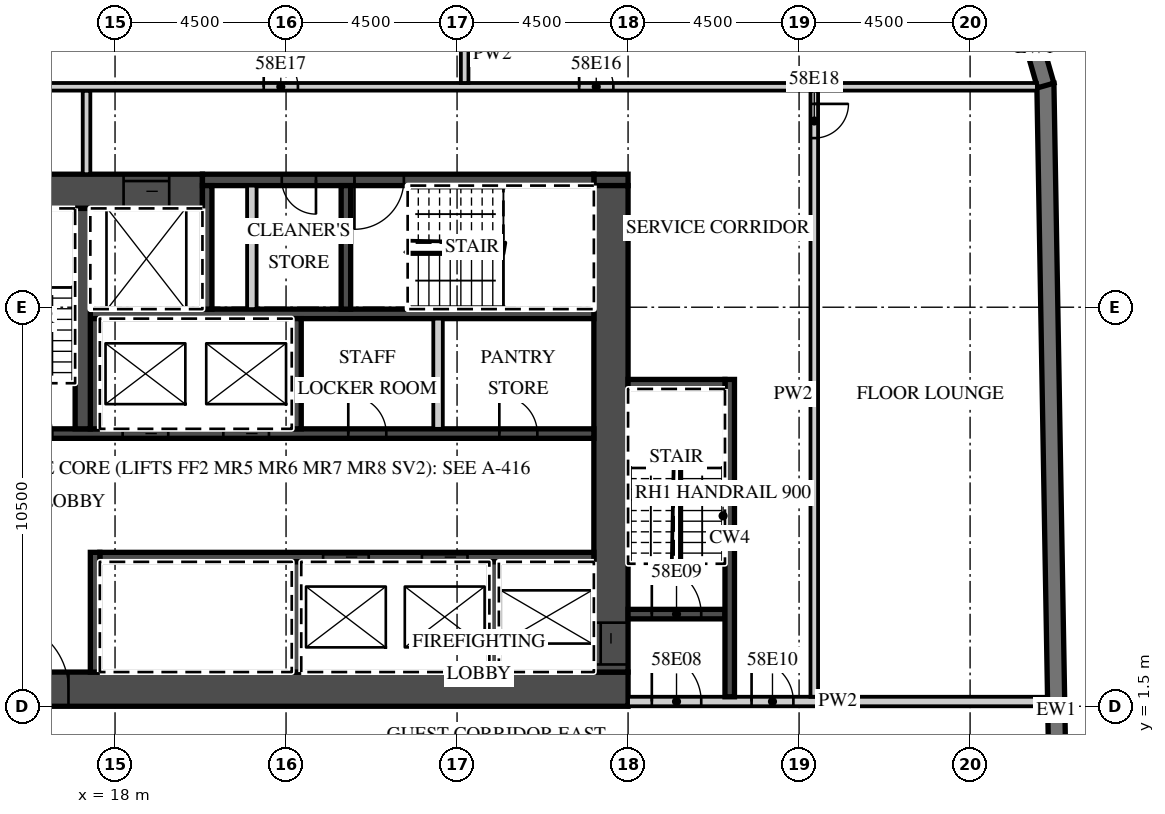
"""IFC4 building model, lengths in metres.
Left out: names, types, materials, properties, quantities, classifications, styles, units other than length and angle.
Written with IfcOpenShell. Run it as: python <this file> out.ifc"""

import sys

from ifc_helpers import new_model, si_unit, direction, frame, frame_2d, origin, place, context, subcontext, project, spatial, polyline, rectangle, outline, extrude, element, fill, save


model = new_model("IFC4")
c1 = context("Model", 3, precision=1e-05, world=origin(), true_north=direction((0.0, 1.0)))
c2 = subcontext(c1, "Body", "Model", "MODEL_VIEW")
j1 = project(units=[si_unit("LENGTHUNIT", "METRE"), si_unit("PLANEANGLEUNIT", "RADIAN")], contexts=[c1])
p1 = place(None, origin())
s1 = spatial("IfcSite", under=j1, at=p1, CompositionType="ELEMENT")
p2 = place(p1, origin())
s2 = spatial("IfcBuilding", under=s1, at=p2, CompositionType="ELEMENT")
p3 = place(p2, frame((0.0, 0.0, 237.5)))
s3 = spatial("IfcBuildingStorey", under=s2, at=p3, CompositionType="ELEMENT", Elevation=237.5)
p4 = place(p3, frame((43.057, -15.103, 0.0), z_axis=(0.0, 0.0, 1.0), x_axis=(-0.017452408953, 0.999847695112, 0.0)))
e1 = element("IfcWall", 1, at=p4, inside=s3, PredefinedType="SOLIDWALL", context=c2, shape_type="SweptSolid", body=[
    extrude(rectangle(XDim=33.0, YDim=0.45, at=frame_2d((16.5, 0.0))), origin(), (0.0, 0.0, 1.0), 3.02),
])
p5 = place(p3, frame((42.49, 17.833, 0.0), z_axis=(0.0, 0.0, 1.0), x_axis=(-0.275546368831, 0.961287781377, 0.0)))
e2 = element("IfcWall", 2, at=p5, inside=s3, PredefinedType="SOLIDWALL", context=c2, shape_type="SweptSolid", body=[
    extrude(outline(polyline([(0.0, -0.225), (2.071, -0.225), (1.95, 0.225), (0.121, 0.225), (0.0, -0.225)])), origin(), (0.0, 0.0, 1.0), 3.02),
])
p6 = place(p3, frame((13.5, 1.95, 0.0), z_axis=(0.0, 0.0, 1.0), x_axis=(1.0, 0.0, 0.0)))
e3 = element("IfcWall", 3, at=p6, inside=s3, PredefinedType="SHEAR", context=c2, shape_type="SweptSolid", body=[
    extrude(rectangle(XDim=18.0, YDim=0.9, at=frame_2d((9.0, 0.0))), origin(), (0.0, 0.0, 1.0), 3.02),
])
p7 = place(p6, frame((1.475, 0.0, 0.0)))
e4 = element("IfcOpeningElement", 4, at=p7, cuts=e3, PredefinedType="OPENING", context=c2, shape_type="SweptSolid", body=[
    extrude(rectangle(XDim=1.8, YDim=2.1, at=frame_2d((0.9, 1.05))), frame((0.0, 0.46, 0.0), z_axis=(0.0, -1.0, 0.0), x_axis=(1.0, 0.0, 0.0)), (0.0, 0.0, 1.0), 0.92),
])
p8 = place(p3, frame((13.5, 15.05, 0.0), z_axis=(0.0, 0.0, 1.0), x_axis=(1.0, 0.0, 0.0)))
e5 = element("IfcWall", 5, at=p8, inside=s3, PredefinedType="SHEAR", context=c2, shape_type="SweptSolid", body=[
    extrude(rectangle(XDim=6.8, YDim=0.9, at=frame_2d((3.4, 0.0))), origin(), (0.0, 0.0, 1.0), 3.02),
])
p9 = place(p8, frame((4.725, 0.0, 0.0)))
e6 = element("IfcOpeningElement", 6, at=p9, cuts=e5, PredefinedType="OPENING", context=c2, shape_type="SweptSolid", body=[
    extrude(rectangle(XDim=1.2, YDim=2.1, at=frame_2d((0.6, 1.05))), frame((0.0, 0.46, 0.0), z_axis=(0.0, -1.0, 0.0), x_axis=(1.0, 0.0, 0.0)), (0.0, 0.0, 1.0), 0.92),
])
p10 = place(p3, frame((30.6, 15.35, 0.0), z_axis=(0.0, 0.0, 1.0), x_axis=(1.0, 0.0, 0.0)))
e7 = element("IfcWall", 7, at=p10, inside=s3, PredefinedType="SHEAR", context=c2, shape_type="SweptSolid", body=[
    extrude(rectangle(XDim=0.9, YDim=0.3, at=frame_2d((0.45, 0.0))), origin(), (0.0, 0.0, 1.0), 3.02),
])
p11 = place(p3, frame((20.3, 15.35, 0.0), z_axis=(0.0, 0.0, 1.0), x_axis=(1.0, 0.0, 0.0)))
e8 = element("IfcWall", 8, at=p11, inside=s3, PredefinedType="SHEAR", context=c2, shape_type="SweptSolid", body=[
    extrude(rectangle(XDim=10.3, YDim=0.3, at=frame_2d((5.15, 0.0))), origin(), (0.0, 0.0, 1.0), 3.02),
])
p12 = place(p11, frame((4.0, 0.0, 0.0)))
e9 = element("IfcOpeningElement", 9, at=p12, cuts=e8, PredefinedType="OPENING", context=c2, shape_type="SweptSolid", body=[
    extrude(rectangle(XDim=1.3, YDim=2.1, at=frame_2d((0.65, 1.05))), frame((0.0, 0.16, 0.0), z_axis=(0.0, -1.0, 0.0), x_axis=(1.0, 0.0, 0.0)), (0.0, 0.0, 1.0), 0.32),
])
p13 = place(p11, frame((2.087, 0.0, 0.0)))
e10 = element("IfcOpeningElement", 10, at=p13, cuts=e8, PredefinedType="OPENING", context=c2, shape_type="SweptSolid", body=[
    extrude(rectangle(XDim=0.9, YDim=2.1, at=frame_2d((0.45, 1.05))), frame((0.0, 0.16, 0.0), z_axis=(0.0, -1.0, 0.0), x_axis=(1.0, 0.0, 0.0)), (0.0, 0.0, 1.0), 0.32),
])
p14 = place(p3, frame((31.05, 2.4, 0.0), z_axis=(0.0, 0.0, 1.0), x_axis=(0.0, 1.0, 0.0)))
e11 = element("IfcWall", 11, at=p14, inside=s3, PredefinedType="SHEAR", context=c2, shape_type="SweptSolid", body=[
    extrude(rectangle(XDim=12.8, YDim=0.9, at=frame_2d((6.4, 0.0))), origin(), (0.0, 0.0, 1.0), 3.02),
])
p15 = place(p14, frame((0.2, 0.0, 0.0)))
e12 = element("IfcOpeningElement", 12, at=p15, cuts=e11, PredefinedType="OPENING", context=c2, shape_type="SweptSolid", body=[
    extrude(rectangle(XDim=1.1, YDim=2.1, at=frame_2d((0.55, 1.05))), frame((0.0, 0.46, 0.0), z_axis=(0.0, -1.0, 0.0), x_axis=(1.0, 0.0, 0.0)), (0.0, 0.0, 1.0), 0.92),
])
p16 = place(p3, frame((17.6, 5.425, 0.0), z_axis=(0.0, 0.0, 1.0), x_axis=(1.0, 0.0, 0.0)))
e13 = element("IfcWall", 13, at=p16, inside=s3, PredefinedType="SHEAR", context=c2, shape_type="SweptSolid", body=[
    extrude(rectangle(XDim=13.0, YDim=0.25, at=frame_2d((6.5, 0.0))), origin(), (0.0, 0.0, 1.0), 3.02),
])
p17 = place(p16, frame((8.475, 0.0, 0.0)))
e14 = element("IfcOpeningElement", 14, at=p17, cuts=e13, PredefinedType="OPENING", context=c2, shape_type="SweptSolid", body=[
    extrude(rectangle(XDim=1.2, YDim=2.1, at=frame_2d((0.6, 1.05))), frame((0.0, 0.135, 0.0), z_axis=(0.0, -1.0, 0.0), x_axis=(1.0, 0.0, 0.0)), (0.0, 0.0, 1.0), 0.27),
])
p18 = place(p16, frame((5.875, 0.0, 0.0)))
e15 = element("IfcOpeningElement", 15, at=p18, cuts=e13, PredefinedType="OPENING", context=c2, shape_type="SweptSolid", body=[
    extrude(rectangle(XDim=1.2, YDim=2.1, at=frame_2d((0.6, 1.05))), frame((0.0, 0.135, 0.0), z_axis=(0.0, -1.0, 0.0), x_axis=(1.0, 0.0, 0.0)), (0.0, 0.0, 1.0), 0.27),
])
p19 = place(p3, frame((17.475, 2.4, 0.0), z_axis=(0.0, 0.0, 1.0), x_axis=(0.0, 1.0, 0.0)))
e16 = element("IfcWall", 16, at=p19, inside=s3, PredefinedType="SHEAR", context=c2, shape_type="SweptSolid", body=[
    extrude(rectangle(XDim=3.15, YDim=0.25, at=frame_2d((1.575, 0.0))), origin(), (0.0, 0.0, 1.0), 3.02),
])
for number, where, z_axis, x_axis in (
    (17, (27.975, 2.4, 0.0), (0.0, 0.0, 1.0), (0.0, 1.0, 0.0)),
    (18, (22.775, 2.4, 0.0), (0.0, 0.0, 1.0), (0.0, 1.0, 0.0)),
):
    element("IfcWall", number, at=place(p3, frame(where, z_axis=z_axis, x_axis=x_axis)), inside=s3, PredefinedType="SHEAR", context=c2, shape_type="SweptSolid", body=[
        extrude(rectangle(XDim=2.9, YDim=0.25, at=frame_2d((1.45, 0.0))), origin(), (0.0, 0.0, 1.0), 3.02),
    ])
p20 = place(p3, frame((14.4, 8.675, 0.0), z_axis=(0.0, 0.0, 1.0), x_axis=(1.0, 0.0, 0.0)))
e19 = element("IfcWall", 19, at=p20, inside=s3, PredefinedType="SHEAR", context=c2, shape_type="SweptSolid", body=[
    extrude(rectangle(XDim=16.2, YDim=0.25, at=frame_2d((8.1, 0.0))), origin(), (0.0, 0.0, 1.0), 3.02),
])
p21 = place(p20, frame((6.45, 0.0, 0.0)))
e20 = element("IfcOpeningElement", 20, at=p21, cuts=e19, PredefinedType="OPENING", context=c2, shape_type="SweptSolid", body=[
    extrude(rectangle(XDim=1.2, YDim=2.1, at=frame_2d((0.6, 1.05))), frame((0.0, 0.135, 0.0), z_axis=(0.0, -1.0, 0.0), x_axis=(1.0, 0.0, 0.0)), (0.0, 0.0, 1.0), 0.27),
])
p22 = place(p20, frame((3.8, 0.0, 0.0)))
e21 = element("IfcOpeningElement", 21, at=p22, cuts=e19, PredefinedType="OPENING", context=c2, shape_type="SweptSolid", body=[
    extrude(rectangle(XDim=1.2, YDim=2.1, at=frame_2d((0.6, 1.05))), frame((0.0, 0.135, 0.0), z_axis=(0.0, -1.0, 0.0), x_axis=(1.0, 0.0, 0.0)), (0.0, 0.0, 1.0), 0.27),
])
p23 = place(p20, frame((0.65, 0.0, 0.0)))
e22 = element("IfcOpeningElement", 22, at=p23, cuts=e19, PredefinedType="OPENING", context=c2, shape_type="SweptSolid", body=[
    extrude(rectangle(XDim=1.3, YDim=2.1, at=frame_2d((0.65, 1.05))), frame((0.0, 0.135, 0.0), z_axis=(0.0, -1.0, 0.0), x_axis=(1.0, 0.0, 0.0)), (0.0, 0.0, 1.0), 0.27),
])
p24 = place(p20, frame((13.712, 0.0, 0.0)))
e23 = element("IfcOpeningElement", 23, at=p24, cuts=e19, PredefinedType="OPENING", context=c2, shape_type="SweptSolid", body=[
    extrude(rectangle(XDim=1.0, YDim=2.1, at=frame_2d((0.5, 1.05))), frame((0.0, 0.135, 0.0), z_axis=(0.0, -1.0, 0.0), x_axis=(1.0, 0.0, 0.0)), (0.0, 0.0, 1.0), 0.27),
])
p25 = place(p20, frame((9.738, 0.0, 0.0)))
e24 = element("IfcOpeningElement", 24, at=p25, cuts=e19, PredefinedType="OPENING", context=c2, shape_type="SweptSolid", body=[
    extrude(rectangle(XDim=1.0, YDim=2.1, at=frame_2d((0.5, 1.05))), frame((0.0, 0.135, 0.0), z_axis=(0.0, -1.0, 0.0), x_axis=(1.0, 0.0, 0.0)), (0.0, 0.0, 1.0), 0.27),
])
p26 = place(p3, frame((17.35, 11.825, 0.0), z_axis=(0.0, 0.0, 1.0), x_axis=(1.0, 0.0, 0.0)))
e25 = element("IfcWall", 25, at=p26, inside=s3, PredefinedType="SHEAR", context=c2, shape_type="SweptSolid", body=[
    extrude(rectangle(XDim=13.25, YDim=0.25, at=frame_2d((6.625, 0.0))), origin(), (0.0, 0.0, 1.0), 3.02),
])
for number, where, z_axis, x_axis in (
    (26, (17.475, 8.8, 0.0), (0.0, 0.0, 1.0), (0.0, 1.0, 0.0)),
    (27, (22.775, 8.8, 0.0), (0.0, 0.0, 1.0), (0.0, 1.0, 0.0)),
):
    element("IfcWall", number, at=place(p3, frame(where, z_axis=z_axis, x_axis=x_axis)), inside=s3, PredefinedType="SHEAR", context=c2, shape_type="SweptSolid", body=[
        extrude(rectangle(XDim=2.9, YDim=0.25, at=frame_2d((1.45, 0.0))), origin(), (0.0, 0.0, 1.0), 3.02),
    ])
p27 = place(p3, frame((26.5, 8.8, 0.0), z_axis=(0.0, 0.0, 1.0), x_axis=(0.0, 1.0, 0.0)))
e28 = element("IfcWall", 28, at=p27, inside=s3, PredefinedType="PARTITIONING", context=c2, shape_type="SweptSolid", body=[
    extrude(rectangle(XDim=2.9, YDim=0.25, at=frame_2d((1.45, 0.0))), origin(), (0.0, 0.0, 1.0), 3.02),
])
p28 = place(p3, frame((17.15, 8.8, 0.0), z_axis=(0.0, 0.0, 1.0), x_axis=(0.0, 1.0, 0.0)))
e29 = element("IfcWall", 29, at=p28, inside=s3, PredefinedType="SHEAR", context=c2, shape_type="SweptSolid", body=[
    extrude(rectangle(XDim=5.8, YDim=0.4, at=frame_2d((2.9, 0.0))), origin(), (0.0, 0.0, 1.0), 3.02),
])
for number, where, z_axis, x_axis in (
    (30, (20.425, 11.95, 0.0), (0.0, 0.0, 1.0), (0.0, 1.0, 0.0)),
    (31, (24.075, 11.95, 0.0), (0.0, 0.0, 1.0), (0.0, 1.0, 0.0)),
):
    element("IfcWall", number, at=place(p3, frame(where, z_axis=z_axis, x_axis=x_axis)), inside=s3, PredefinedType="SHEAR", context=c2, shape_type="SweptSolid", body=[
        extrude(rectangle(XDim=3.25, YDim=0.25, at=frame_2d((1.625, 0.0))), origin(), (0.0, 0.0, 1.0), 3.02),
    ])
p29 = place(p3, frame((21.6, 11.95, 0.0), z_axis=(0.0, 0.0, 1.0), x_axis=(0.0, 1.0, 0.0)))
e32 = element("IfcWall", 32, at=p29, inside=s3, PredefinedType="PARTITIONING", context=c2, shape_type="SweptSolid", body=[
    extrude(rectangle(XDim=3.25, YDim=0.25, at=frame_2d((1.625, 0.0))), origin(), (0.0, 0.0, 1.0), 3.02),
])
p30 = place(p3, frame((31.5, 1.625, 0.0), z_axis=(0.0, 0.0, 1.0), x_axis=(1.0, 0.0, 0.0)))
e33 = element("IfcWall", 33, at=p30, inside=s3, PredefinedType="PARTITIONING", context=c2, shape_type="SweptSolid", body=[
    extrude(rectangle(XDim=11.04, YDim=0.25, at=frame_2d((5.52, 0.0))), origin(), (0.0, 0.0, 1.0), 3.02),
])
p31 = place(p30, frame((0.625, 0.0, 0.0)))
e34 = element("IfcOpeningElement", 34, at=p31, cuts=e33, PredefinedType="OPENING", context=c2, shape_type="SweptSolid", body=[
    extrude(rectangle(XDim=1.3, YDim=2.1, at=frame_2d((0.65, 1.05))), frame((0.0, 0.135, 0.0), z_axis=(0.0, -1.0, 0.0), x_axis=(1.0, 0.0, 0.0)), (0.0, 0.0, 1.0), 0.27),
])
p32 = place(p30, frame((3.25, 0.0, 0.0)))
e35 = element("IfcOpeningElement", 35, at=p32, cuts=e33, PredefinedType="OPENING", context=c2, shape_type="SweptSolid", body=[
    extrude(rectangle(XDim=1.1, YDim=2.1, at=frame_2d((0.55, 1.05))), frame((0.0, 0.135, 0.0), z_axis=(0.0, -1.0, 0.0), x_axis=(1.0, 0.0, 0.0)), (0.0, 0.0, 1.0), 0.27),
])
p33 = place(p3, frame((31.5, 3.925, 0.0), z_axis=(0.0, 0.0, 1.0), x_axis=(1.0, 0.0, 0.0)))
e36 = element("IfcWall", 36, at=p33, inside=s3, PredefinedType="SHEAR", context=c2, shape_type="SweptSolid", body=[
    extrude(rectangle(XDim=2.55, YDim=0.25, at=frame_2d((1.275, 0.0))), origin(), (0.0, 0.0, 1.0), 3.02),
])
p34 = place(p33, frame((0.625, 0.0, 0.0)))
e37 = element("IfcOpeningElement", 37, at=p34, cuts=e36, PredefinedType="OPENING", context=c2, shape_type="SweptSolid", body=[
    extrude(rectangle(XDim=1.3, YDim=2.1, at=frame_2d((0.65, 1.05))), frame((0.0, 0.135, 0.0), z_axis=(0.0, -1.0, 0.0), x_axis=(1.0, 0.0, 0.0)), (0.0, 0.0, 1.0), 0.27),
])
p35 = place(p3, frame((34.175, 1.75, 0.0), z_axis=(0.0, 0.0, 1.0), x_axis=(0.0, 1.0, 0.0)))
e38 = element("IfcWall", 38, at=p35, inside=s3, PredefinedType="SHEAR", context=c2, shape_type="SweptSolid", body=[
    extrude(rectangle(XDim=8.35, YDim=0.25, at=frame_2d((4.175, 0.0))), origin(), (0.0, 0.0, 1.0), 3.02),
])
p36 = place(p3, frame((31.5, 9.975, 0.0), z_axis=(0.0, 0.0, 1.0), x_axis=(1.0, 0.0, 0.0)))
e39 = element("IfcWall", 39, at=p36, inside=s3, PredefinedType="SHEAR", context=c2, shape_type="SweptSolid", body=[
    extrude(rectangle(XDim=2.55, YDim=0.25, at=frame_2d((1.275, 0.0))), origin(), (0.0, 0.0, 1.0), 3.02),
])
p37 = place(p3, frame((17.25, 15.5, 0.0), z_axis=(0.0, 0.0, 1.0), x_axis=(0.0, 1.0, 0.0)))
e40 = element("IfcWall", 40, at=p37, inside=s3, PredefinedType="PARTITIONING", context=c2, shape_type="SweptSolid", body=[
    extrude(rectangle(XDim=2.2, YDim=0.2, at=frame_2d((1.1, 0.0))), origin(), (0.0, 0.0, 1.0), 3.02),
])
p38 = place(p3, frame((36.4, 1.75, 0.0), z_axis=(0.0, 0.0, 1.0), x_axis=(0.0, 1.0, 0.0)))
e41 = element("IfcWall", 41, at=p38, inside=s3, PredefinedType="PARTITIONING", context=c2, shape_type="SweptSolid", body=[
    extrude(rectangle(XDim=15.95, YDim=0.2, at=frame_2d((7.975, 0.0))), origin(), (0.0, 0.0, 1.0), 3.02),
])
p39 = place(p38, frame((14.7, 0.0, 0.0)))
e42 = element("IfcOpeningElement", 42, at=p39, cuts=e41, PredefinedType="OPENING", context=c2, shape_type="SweptSolid", body=[
    extrude(rectangle(XDim=0.9, YDim=2.1, at=frame_2d((0.45, 1.05))), frame((0.0, 0.11, 0.0), z_axis=(0.0, -1.0, 0.0), x_axis=(1.0, 0.0, 0.0)), (0.0, 0.0, 1.0), 0.22),
])
p40 = place(p3, frame((13.6, 17.8, 0.0), z_axis=(0.0, 0.0, 1.0), x_axis=(1.0, 0.0, 0.0)))
e43 = element("IfcWall", 43, at=p40, inside=s3, PredefinedType="PARTITIONING", context=c2, shape_type="SweptSolid", body=[
    extrude(rectangle(XDim=28.657, YDim=0.2, at=frame_2d((14.329, 0.0))), origin(), (0.0, 0.0, 1.0), 3.02),
])
p41 = place(p40, frame((16.613, 0.0, 0.0)))
e44 = element("IfcOpeningElement", 44, at=p41, cuts=e43, PredefinedType="OPENING", context=c2, shape_type="SweptSolid", body=[
    extrude(rectangle(XDim=0.9, YDim=2.1, at=frame_2d((0.45, 1.05))), frame((0.0, 0.11, 0.0), z_axis=(0.0, -1.0, 0.0), x_axis=(1.0, 0.0, 0.0)), (0.0, 0.0, 1.0), 0.22),
])
p42 = place(p40, frame((8.312, 0.0, 0.0)))
e45 = element("IfcOpeningElement", 45, at=p42, cuts=e43, PredefinedType="OPENING", context=c2, shape_type="SweptSolid", body=[
    extrude(rectangle(XDim=0.9, YDim=2.1, at=frame_2d((0.45, 1.05))), frame((0.0, 0.11, 0.0), z_axis=(0.0, -1.0, 0.0), x_axis=(1.0, 0.0, 0.0)), (0.0, 0.0, 1.0), 0.22),
])
p43 = place(p3, frame((27.2, 17.9, 0.0), z_axis=(0.0, 0.0, 1.0), x_axis=(0.0, 1.0, 0.0)))
e46 = element("IfcWall", 46, at=p43, inside=s3, PredefinedType="PARTITIONING", context=c2, shape_type="SweptSolid", body=[
    extrude(rectangle(XDim=3.276, YDim=0.2, at=frame_2d((1.638, 0.0))), origin(), (0.0, 0.0, 1.0), 3.02),
])
p44 = place(p21, origin())
e47 = element("IfcDoor", 47, at=p44, inside=s3, OperationType="SLIDING_TO_LEFT", PredefinedType="DOOR", context=c2, shape_type="SweptSolid", body=[
    extrude(rectangle(XDim=1.2, YDim=2.1, at=frame_2d((0.6, 1.05))), frame((0.0, 0.025, 0.0), z_axis=(0.0, -1.0, 0.0), x_axis=(1.0, 0.0, 0.0)), (0.0, 0.0, 1.0), 0.05),
])
fill(e20, e47)
p45 = place(p22, origin())
e48 = element("IfcDoor", 48, at=p45, inside=s3, OperationType="SLIDING_TO_RIGHT", PredefinedType="DOOR", context=c2, shape_type="SweptSolid", body=[
    extrude(rectangle(XDim=1.2, YDim=2.1, at=frame_2d((0.6, 1.05))), frame((0.0, 0.025, 0.0), z_axis=(0.0, -1.0, 0.0), x_axis=(1.0, 0.0, 0.0)), (0.0, 0.0, 1.0), 0.05),
])
fill(e21, e48)
p46 = place(p17, origin())
e49 = element("IfcDoor", 49, at=p46, inside=s3, OperationType="SLIDING_TO_LEFT", PredefinedType="DOOR", context=c2, shape_type="SweptSolid", body=[
    extrude(rectangle(XDim=1.2, YDim=2.1, at=frame_2d((0.6, 1.05))), frame((0.0, 0.025, 0.0), z_axis=(0.0, -1.0, 0.0), x_axis=(1.0, 0.0, 0.0)), (0.0, 0.0, 1.0), 0.05),
])
fill(e14, e49)
p47 = place(p18, origin())
e50 = element("IfcDoor", 50, at=p47, inside=s3, OperationType="SLIDING_TO_RIGHT", PredefinedType="DOOR", context=c2, shape_type="SweptSolid", body=[
    extrude(rectangle(XDim=1.2, YDim=2.1, at=frame_2d((0.6, 1.05))), frame((0.0, 0.025, 0.0), z_axis=(0.0, -1.0, 0.0), x_axis=(1.0, 0.0, 0.0)), (0.0, 0.0, 1.0), 0.05),
])
fill(e15, e50)
p48 = place(p9, origin())
e51 = element("IfcDoor", 51, at=p48, inside=s3, OperationType="SLIDING_TO_LEFT", PredefinedType="DOOR", context=c2, shape_type="SweptSolid", body=[
    extrude(rectangle(XDim=1.2, YDim=2.1, at=frame_2d((0.6, 1.05))), frame((0.0, 0.025, 0.0), z_axis=(0.0, -1.0, 0.0), x_axis=(1.0, 0.0, 0.0)), (0.0, 0.0, 1.0), 0.05),
])
fill(e6, e51)
p49 = place(p15, origin())
e52 = element("IfcDoor", 52, at=p49, inside=s3, OperationType="SLIDING_TO_LEFT", PredefinedType="DOOR", context=c2, shape_type="SweptSolid", body=[
    extrude(rectangle(XDim=1.1, YDim=2.1, at=frame_2d((0.55, 1.05))), frame((0.0, 0.025, 0.0), z_axis=(0.0, -1.0, 0.0), x_axis=(1.0, 0.0, 0.0)), (0.0, 0.0, 1.0), 0.05),
])
fill(e12, e52)
p50 = place(p7, origin())
e53 = element("IfcDoor", 53, at=p50, inside=s3, OperationType="DOUBLE_DOOR_DOUBLE_SWING", PredefinedType="DOOR", context=c2, shape_type="SweptSolid", body=[
    extrude(rectangle(XDim=1.8, YDim=2.1, at=frame_2d((0.9, 1.05))), frame((0.0, 0.025, 0.0), z_axis=(0.0, -1.0, 0.0), x_axis=(1.0, 0.0, 0.0)), (0.0, 0.0, 1.0), 0.05),
])
fill(e4, e53)
p51 = place(p31, origin())
e54 = element("IfcDoor", 54, at=p51, inside=s3, OperationType="SINGLE_SWING_LEFT", PredefinedType="DOOR", context=c2, shape_type="SweptSolid", body=[
    extrude(rectangle(XDim=1.3, YDim=2.1, at=frame_2d((0.65, 1.05))), frame((0.0, 0.025, 0.0), z_axis=(0.0, -1.0, 0.0), x_axis=(1.0, 0.0, 0.0)), (0.0, 0.0, 1.0), 0.05),
])
fill(e34, e54)
p52 = place(p34, origin())
e55 = element("IfcDoor", 55, at=p52, inside=s3, OperationType="SINGLE_SWING_LEFT", PredefinedType="DOOR", context=c2, shape_type="SweptSolid", body=[
    extrude(rectangle(XDim=1.3, YDim=2.1, at=frame_2d((0.65, 1.05))), frame((0.0, 0.025, 0.0), z_axis=(0.0, -1.0, 0.0), x_axis=(1.0, 0.0, 0.0)), (0.0, 0.0, 1.0), 0.05),
])
fill(e37, e55)
p53 = place(p32, origin())
e56 = element("IfcDoor", 56, at=p53, inside=s3, OperationType="SINGLE_SWING_LEFT", PredefinedType="DOOR", context=c2, shape_type="SweptSolid", body=[
    extrude(rectangle(XDim=1.1, YDim=2.1, at=frame_2d((0.55, 1.05))), frame((0.0, 0.025, 0.0), z_axis=(0.0, -1.0, 0.0), x_axis=(1.0, 0.0, 0.0)), (0.0, 0.0, 1.0), 0.05),
])
fill(e35, e56)
p54 = place(p12, origin())
e57 = element("IfcDoor", 57, at=p54, inside=s3, OperationType="SINGLE_SWING_LEFT", PredefinedType="DOOR", context=c2, shape_type="SweptSolid", body=[
    extrude(rectangle(XDim=1.3, YDim=2.1, at=frame_2d((0.65, 1.05))), frame((0.0, 0.025, 0.0), z_axis=(0.0, -1.0, 0.0), x_axis=(1.0, 0.0, 0.0)), (0.0, 0.0, 1.0), 0.05),
])
fill(e9, e57)
p55 = place(p13, origin())
e58 = element("IfcDoor", 58, at=p55, inside=s3, OperationType="SINGLE_SWING_RIGHT", PredefinedType="DOOR", context=c2, shape_type="SweptSolid", body=[
    extrude(rectangle(XDim=0.9, YDim=2.1, at=frame_2d((0.45, 1.05))), frame((0.0, 0.025, 0.0), z_axis=(0.0, -1.0, 0.0), x_axis=(1.0, 0.0, 0.0)), (0.0, 0.0, 1.0), 0.05),
])
fill(e10, e58)
p56 = place(p24, origin())
e59 = element("IfcDoor", 59, at=p56, inside=s3, OperationType="SINGLE_SWING_LEFT", PredefinedType="DOOR", context=c2, shape_type="SweptSolid", body=[
    extrude(rectangle(XDim=1.0, YDim=2.1, at=frame_2d((0.5, 1.05))), frame((0.0, 0.025, 0.0), z_axis=(0.0, -1.0, 0.0), x_axis=(1.0, 0.0, 0.0)), (0.0, 0.0, 1.0), 0.05),
])
fill(e23, e59)
p57 = place(p25, origin())
e60 = element("IfcDoor", 60, at=p57, inside=s3, OperationType="SINGLE_SWING_LEFT", PredefinedType="DOOR", context=c2, shape_type="SweptSolid", body=[
    extrude(rectangle(XDim=1.0, YDim=2.1, at=frame_2d((0.5, 1.05))), frame((0.0, 0.025, 0.0), z_axis=(0.0, -1.0, 0.0), x_axis=(1.0, 0.0, 0.0)), (0.0, 0.0, 1.0), 0.05),
])
fill(e24, e60)
p58 = place(p41, origin())
e61 = element("IfcDoor", 61, at=p58, inside=s3, OperationType="SINGLE_SWING_LEFT", PredefinedType="DOOR", context=c2, shape_type="SweptSolid", body=[
    extrude(rectangle(XDim=0.9, YDim=2.1, at=frame_2d((0.45, 1.05))), frame((0.0, 0.025, 0.0), z_axis=(0.0, -1.0, 0.0), x_axis=(1.0, 0.0, 0.0)), (0.0, 0.0, 1.0), 0.05),
])
fill(e44, e61)
p59 = place(p42, origin())
e62 = element("IfcDoor", 62, at=p59, inside=s3, OperationType="SINGLE_SWING_LEFT", PredefinedType="DOOR", context=c2, shape_type="SweptSolid", body=[
    extrude(rectangle(XDim=0.9, YDim=2.1, at=frame_2d((0.45, 1.05))), frame((0.0, 0.025, 0.0), z_axis=(0.0, -1.0, 0.0), x_axis=(1.0, 0.0, 0.0)), (0.0, 0.0, 1.0), 0.05),
])
fill(e45, e62)
p60 = place(p39, origin())
e63 = element("IfcDoor", 63, at=p60, inside=s3, OperationType="SINGLE_SWING_RIGHT", PredefinedType="DOOR", context=c2, shape_type="SweptSolid", body=[
    extrude(rectangle(XDim=0.9, YDim=2.1, at=frame_2d((0.45, 1.05))), frame((0.0, 0.025, 0.0), z_axis=(0.0, -1.0, 0.0), x_axis=(1.0, 0.0, 0.0)), (0.0, 0.0, 1.0), 0.05),
])
fill(e42, e63)
save(model, sys.argv[1])
